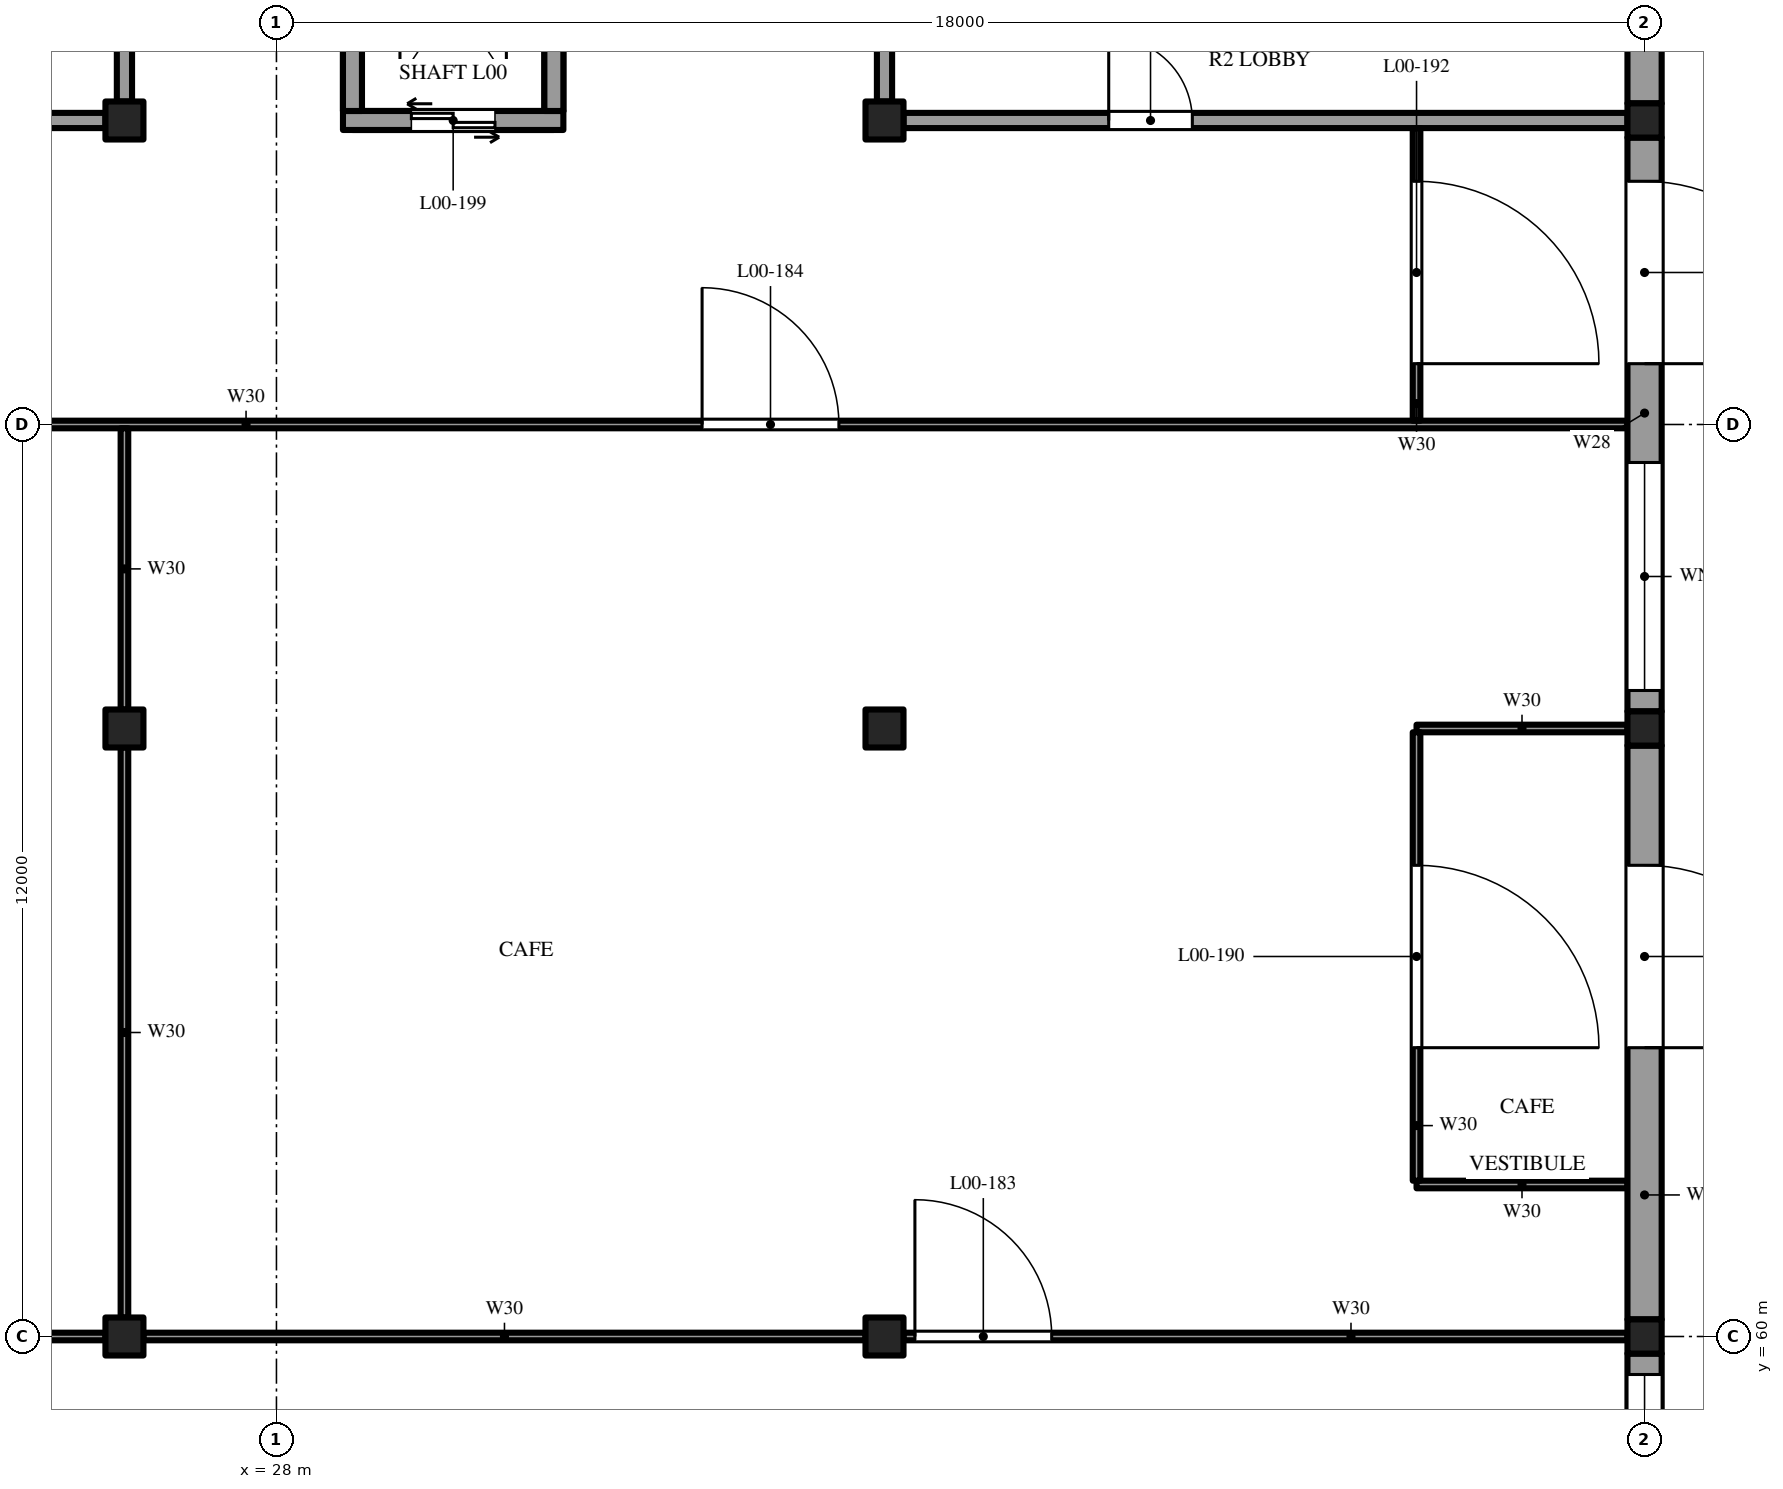
"""IFC4 building model, lengths in metres.
Left out: names, types, materials, properties, quantities, classifications, styles, units other than length and angle.
Written with IfcOpenShell. Run it as: python <this file> out.ifc"""

import sys

from ifc_helpers import new_model, si_unit, direction, frame, frame_2d, origin, origin_2d, place, context, subcontext, project, spatial, rectangle, extrude, element, fill, save


model = new_model("IFC4")
c1 = context("Model", 3, precision=1e-05, world=origin(), true_north=direction((0.0, 1.0)))
c2 = subcontext(c1, "Body", "Model", "MODEL_VIEW")
j1 = project(units=[si_unit("LENGTHUNIT", "METRE"), si_unit("PLANEANGLEUNIT", "RADIAN")], contexts=[c1])
p1 = place(None, origin())
s1 = spatial("IfcSite", under=j1, at=p1, CompositionType="ELEMENT")
p2 = place(p1, origin())
s2 = spatial("IfcBuilding", under=s1, at=p2, CompositionType="ELEMENT")
p3 = place(p2, origin())
s3 = spatial("IfcBuildingStorey", under=s2, at=p3, CompositionType="ELEMENT", Elevation=0.0)
for number, where, z_axis, x_axis in (
    (1, (26.0, 60.0, -0.4), (0.0, 0.0, 1.0), (1.0, 0.0, 0.0)),
    (2, (26.0, 68.0, -0.4), (0.0, 0.0, 1.0), (1.0, 0.0, 0.0)),
    (3, (26.0, 76.0, -0.4), (0.0, 0.0, 1.0), (1.0, 0.0, 0.0)),
    (4, (36.0, 60.0, -0.4), (0.0, 0.0, 1.0), (1.0, 0.0, 0.0)),
    (5, (36.0, 68.0, -0.4), (0.0, 0.0, 1.0), (1.0, 0.0, 0.0)),
    (6, (36.0, 76.0, -0.4), (0.0, 0.0, 1.0), (1.0, 0.0, 0.0)),
):
    element("IfcColumn", number, at=place(p3, frame(where, z_axis=z_axis, x_axis=x_axis)), inside=s3, PredefinedType="COLUMN", context=c2, shape_type="SweptSolid", body=[
        extrude(rectangle(XDim=0.5, YDim=0.5, at=origin_2d()), origin(), (0.0, 0.0, 1.0), 7.6),
    ])
for number, where, z_axis, x_axis in (
    (7, (46.0, 60.0, -0.4), (0.0, 0.0, 1.0), (1.0, 0.0, 0.0)),
    (8, (46.0, 68.0, -0.4), (0.0, 0.0, 1.0), (1.0, 0.0, 0.0)),
    (9, (46.0, 76.0, -0.4), (0.0, 0.0, 1.0), (1.0, 0.0, 0.0)),
):
    element("IfcColumn", number, at=place(p3, frame(where, z_axis=z_axis, x_axis=x_axis)), inside=s3, PredefinedType="COLUMN", context=c2, shape_type="SweptSolid", body=[
        extrude(rectangle(XDim=0.45, YDim=0.45, at=origin_2d()), origin(), (0.0, 0.0, 1.0), 7.6),
    ])
for number, where, z_axis, x_axis in (
    (10, (16.25, 60.0, 0.0), (0.0, 0.0, 1.0), (1.0, 0.0, 0.0)),
    (11, (26.25, 60.0, 0.0), (0.0, 0.0, 1.0), (1.0, 0.0, 0.0)),
):
    element("IfcWall", number, at=place(p3, frame(where, z_axis=z_axis, x_axis=x_axis)), inside=s3, PredefinedType="PARTITIONING", context=c2, shape_type="SweptSolid", body=[
        extrude(rectangle(XDim=9.5, YDim=0.1, at=frame_2d((4.75, 0.0))), origin(), (0.0, 0.0, 1.0), 6.85),
    ])
p4 = place(p3, frame((36.25, 60.0, 0.0), z_axis=(0.0, 0.0, 1.0), x_axis=(1.0, 0.0, 0.0)))
e12 = element("IfcWall", 12, at=p4, inside=s3, PredefinedType="PARTITIONING", context=c2, shape_type="SweptSolid", body=[
    extrude(rectangle(XDim=9.525, YDim=0.1, at=frame_2d((4.762, 0.0))), origin(), (0.0, 0.0, 1.0), 6.85),
])
p5 = place(p4, frame((0.15, 0.0, 0.0)))
e13 = element("IfcOpeningElement", 13, at=p5, cuts=e12, PredefinedType="OPENING", context=c2, shape_type="SweptSolid", body=[
    extrude(rectangle(XDim=1.8, YDim=2.1, at=frame_2d((0.9, 1.05))), frame((0.0, 0.06, 0.0), z_axis=(0.0, -1.0, 0.0), x_axis=(1.0, 0.0, 0.0)), (0.0, 0.0, 1.0), 0.12),
])
for number, where, z_axis, x_axis in (
    (14, (43.0, 62.0, 0.0), (0.0, 0.0, 1.0), (1.0, 0.0, 0.0)),
    (15, (43.0, 68.0, 0.0), (0.0, 0.0, 1.0), (1.0, 0.0, 0.0)),
):
    element("IfcWall", number, at=place(p3, frame(where, z_axis=z_axis, x_axis=x_axis)), inside=s3, PredefinedType="PARTITIONING", context=c2, shape_type="SweptSolid", body=[
        extrude(rectangle(XDim=2.775, YDim=0.1, at=frame_2d((1.387, 0.0))), origin(), (0.0, 0.0, 1.0), 6.85),
    ])
p6 = place(p3, frame((16.05, 72.0, 0.0), z_axis=(0.0, 0.0, 1.0), x_axis=(1.0, 0.0, 0.0)))
e16 = element("IfcWall", 16, at=p6, inside=s3, PredefinedType="PARTITIONING", context=c2, shape_type="SweptSolid", body=[
    extrude(rectangle(XDim=29.725, YDim=0.1, at=frame_2d((14.862, 0.0))), origin(), (0.0, 0.0, 1.0), 6.85),
])
p7 = place(p6, frame((4.35, 0.0, 0.0)))
e17 = element("IfcOpeningElement", 17, at=p7, cuts=e16, PredefinedType="OPENING", context=c2, shape_type="SweptSolid", body=[
    extrude(rectangle(XDim=1.2, YDim=2.1, at=frame_2d((0.6, 1.05))), frame((0.0, 0.06, 0.0), z_axis=(0.0, -1.0, 0.0), x_axis=(1.0, 0.0, 0.0)), (0.0, 0.0, 1.0), 0.12),
])
p8 = place(p6, frame((17.55, 0.0, 0.0)))
e18 = element("IfcOpeningElement", 18, at=p8, cuts=e16, PredefinedType="OPENING", context=c2, shape_type="SweptSolid", body=[
    extrude(rectangle(XDim=1.8, YDim=2.1, at=frame_2d((0.9, 1.05))), frame((0.0, 0.06, 0.0), z_axis=(0.0, -1.0, 0.0), x_axis=(1.0, 0.0, 0.0)), (0.0, 0.0, 1.0), 0.12),
])
p9 = place(p3, frame((16.25, 76.0, 0.0), z_axis=(0.0, 0.0, 1.0), x_axis=(1.0, 0.0, 0.0)))
e19 = element("IfcWall", 19, at=p9, inside=s3, PredefinedType="SOLIDWALL", context=c2, shape_type="SweptSolid", body=[
    extrude(rectangle(XDim=9.5, YDim=0.2, at=frame_2d((4.75, 0.0))), origin(), (0.0, 0.0, 1.0), 6.85),
])
p10 = place(p9, frame((4.2, 0.0, 0.0)))
e20 = element("IfcOpeningElement", 20, at=p10, cuts=e19, PredefinedType="OPENING", context=c2, shape_type="SweptSolid", body=[
    extrude(rectangle(XDim=1.1, YDim=2.1, at=frame_2d((0.55, 1.05))), frame((0.0, 0.11, 0.0), z_axis=(0.0, -1.0, 0.0), x_axis=(1.0, 0.0, 0.0)), (0.0, 0.0, 1.0), 0.22),
])
p11 = place(p3, frame((29.0, 76.0, 0.0), z_axis=(0.0, 0.0, 1.0), x_axis=(1.0, 0.0, 0.0)))
e21 = element("IfcWall", 21, at=p11, inside=s3, PredefinedType="SOLIDWALL", context=c2, shape_type="SweptSolid", body=[
    extrude(rectangle(XDim=2.65, YDim=0.25, at=frame_2d((1.325, 0.0))), origin(), (0.0, 0.0, 1.0), 6.85),
])
p12 = place(p11, frame((0.775, 0.0, 0.0)))
e22 = element("IfcOpeningElement", 22, at=p12, cuts=e21, PredefinedType="OPENING", context=c2, shape_type="SweptSolid", body=[
    extrude(rectangle(XDim=1.1, YDim=2.1, at=frame_2d((0.55, 1.05))), frame((0.0, 0.135, 0.0), z_axis=(0.0, -1.0, 0.0), x_axis=(1.0, 0.0, 0.0)), (0.0, 0.0, 1.0), 0.27),
])
p13 = place(p3, frame((36.25, 76.0, 0.0), z_axis=(0.0, 0.0, 1.0), x_axis=(1.0, 0.0, 0.0)))
e23 = element("IfcWall", 23, at=p13, inside=s3, PredefinedType="SOLIDWALL", context=c2, shape_type="SweptSolid", body=[
    extrude(rectangle(XDim=9.525, YDim=0.2, at=frame_2d((4.762, 0.0))), origin(), (0.0, 0.0, 1.0), 6.85),
])
p14 = place(p13, frame((2.7, 0.0, 0.0)))
e24 = element("IfcOpeningElement", 24, at=p14, cuts=e23, PredefinedType="OPENING", context=c2, shape_type="SweptSolid", body=[
    extrude(rectangle(XDim=1.1, YDim=2.1, at=frame_2d((0.55, 1.05))), frame((0.0, 0.11, 0.0), z_axis=(0.0, -1.0, 0.0), x_axis=(1.0, 0.0, 0.0)), (0.0, 0.0, 1.0), 0.22),
])
p15 = place(p3, frame((26.0, 60.25, 0.0), z_axis=(0.0, 0.0, 1.0), x_axis=(0.0, 1.0, 0.0)))
e25 = element("IfcWall", 25, at=p15, inside=s3, PredefinedType="PARTITIONING", context=c2, shape_type="SweptSolid", body=[
    extrude(rectangle(XDim=7.5, YDim=0.1, at=frame_2d((3.75, 0.0))), origin(), (0.0, 0.0, 1.0), 6.85),
])
p16 = place(p3, frame((26.0, 68.25, 0.0), z_axis=(0.0, 0.0, 1.0), x_axis=(0.0, 1.0, 0.0)))
e26 = element("IfcWall", 26, at=p16, inside=s3, PredefinedType="PARTITIONING", context=c2, shape_type="SweptSolid", body=[
    extrude(rectangle(XDim=3.7, YDim=0.1, at=frame_2d((1.85, 0.0))), origin(), (0.0, 0.0, 1.0), 6.85),
])
p17 = place(p3, frame((26.0, 76.25, 0.0), z_axis=(0.0, 0.0, 1.0), x_axis=(0.0, 1.0, 0.0)))
e27 = element("IfcWall", 27, at=p17, inside=s3, PredefinedType="SOLIDWALL", context=c2, shape_type="SweptSolid", body=[
    extrude(rectangle(XDim=2.275, YDim=0.2, at=frame_2d((1.137, 0.0))), origin(), (0.0, 0.0, 1.0), 6.85),
])
for number, where, z_axis, x_axis in (
    (28, (29.0, 76.125, 0.0), (0.0, 0.0, 1.0), (0.0, 1.0, 0.0)),
    (29, (31.65, 76.125, 0.0), (0.0, 0.0, 1.0), (0.0, 1.0, 0.0)),
):
    element("IfcWall", number, at=place(p3, frame(where, z_axis=z_axis, x_axis=x_axis)), inside=s3, PredefinedType="SOLIDWALL", context=c2, shape_type="SweptSolid", body=[
        extrude(rectangle(XDim=3.0, YDim=0.25, at=frame_2d((1.5, 0.0))), origin(), (0.0, 0.0, 1.0), 6.85),
    ])
p18 = place(p3, frame((36.0, 76.25, 0.0), z_axis=(0.0, 0.0, 1.0), x_axis=(0.0, 1.0, 0.0)))
e30 = element("IfcWall", 30, at=p18, inside=s3, PredefinedType="SOLIDWALL", context=c2, shape_type="SweptSolid", body=[
    extrude(rectangle(XDim=2.275, YDim=0.2, at=frame_2d((1.137, 0.0))), origin(), (0.0, 0.0, 1.0), 6.85),
])
p19 = place(p3, frame((43.0, 62.05, 0.0), z_axis=(0.0, 0.0, 1.0), x_axis=(0.0, 1.0, 0.0)))
e31 = element("IfcWall", 31, at=p19, inside=s3, PredefinedType="PARTITIONING", context=c2, shape_type="SweptSolid", body=[
    extrude(rectangle(XDim=5.9, YDim=0.1, at=frame_2d((2.95, 0.0))), origin(), (0.0, 0.0, 1.0), 6.85),
])
p20 = place(p19, frame((1.75, 0.0, 0.0)))
e32 = element("IfcOpeningElement", 32, at=p20, cuts=e31, PredefinedType="OPENING", context=c2, shape_type="SweptSolid", body=[
    extrude(rectangle(XDim=2.4, YDim=2.4, at=frame_2d((1.2, 1.2))), frame((0.0, 0.06, 0.0), z_axis=(0.0, -1.0, 0.0), x_axis=(1.0, 0.0, 0.0)), (0.0, 0.0, 1.0), 0.12),
])
p21 = place(p3, frame((43.0, 72.05, 0.0), z_axis=(0.0, 0.0, 1.0), x_axis=(0.0, 1.0, 0.0)))
e33 = element("IfcWall", 33, at=p21, inside=s3, PredefinedType="PARTITIONING", context=c2, shape_type="SweptSolid", body=[
    extrude(rectangle(XDim=3.85, YDim=0.1, at=frame_2d((1.925, 0.0))), origin(), (0.0, 0.0, 1.0), 6.85),
])
p22 = place(p21, frame((0.75, 0.0, 0.0)))
e34 = element("IfcOpeningElement", 34, at=p22, cuts=e33, PredefinedType="OPENING", context=c2, shape_type="SweptSolid", body=[
    extrude(rectangle(XDim=2.4, YDim=2.4, at=frame_2d((1.2, 1.2))), frame((0.0, 0.06, 0.0), z_axis=(0.0, -1.0, 0.0), x_axis=(1.0, 0.0, 0.0)), (0.0, 0.0, 1.0), 0.12),
])
p23 = place(p3, frame((46.0, 52.225, 0.0), z_axis=(0.0, 0.0, 1.0), x_axis=(0.0, 1.0, 0.0)))
e35 = element("IfcWall", 35, at=p23, inside=s3, PredefinedType="SOLIDWALL", context=c2, shape_type="SweptSolid", body=[
    extrude(rectangle(XDim=7.55, YDim=0.45, at=frame_2d((3.775, 0.0))), origin(), (0.0, 0.0, 1.0), 6.85),
])
p24 = place(p23, frame((0.275, 0.0, 1.0)))
e36 = element("IfcOpeningElement", 36, at=p24, cuts=e35, PredefinedType="OPENING", context=c2, shape_type="SweptSolid", body=[
    extrude(rectangle(XDim=3.0, YDim=4.0, at=frame_2d((1.5, 2.0))), frame((0.0, 0.235, 0.0), z_axis=(0.0, -1.0, 0.0), x_axis=(1.0, 0.0, 0.0)), (0.0, 0.0, 1.0), 0.47),
])
p25 = place(p23, frame((4.275, 0.0, 1.0)))
e37 = element("IfcOpeningElement", 37, at=p25, cuts=e35, PredefinedType="OPENING", context=c2, shape_type="SweptSolid", body=[
    extrude(rectangle(XDim=3.0, YDim=4.0, at=frame_2d((1.5, 2.0))), frame((0.0, 0.235, 0.0), z_axis=(0.0, -1.0, 0.0), x_axis=(1.0, 0.0, 0.0)), (0.0, 0.0, 1.0), 0.47),
])
p26 = place(p3, frame((46.0, 60.225, 0.0), z_axis=(0.0, 0.0, 1.0), x_axis=(0.0, 1.0, 0.0)))
e38 = element("IfcWall", 38, at=p26, inside=s3, PredefinedType="SOLIDWALL", context=c2, shape_type="SweptSolid", body=[
    extrude(rectangle(XDim=7.55, YDim=0.45, at=frame_2d((3.775, 0.0))), origin(), (0.0, 0.0, 1.0), 6.85),
])
p27 = place(p26, frame((3.575, 0.0, 0.0)))
e39 = element("IfcOpeningElement", 39, at=p27, cuts=e38, PredefinedType="OPENING", context=c2, shape_type="SweptSolid", body=[
    extrude(rectangle(XDim=2.4, YDim=2.4, at=frame_2d((1.2, 1.2))), frame((0.0, 0.235, 0.0), z_axis=(0.0, -1.0, 0.0), x_axis=(1.0, 0.0, 0.0)), (0.0, 0.0, 1.0), 0.47),
])
p28 = place(p3, frame((46.0, 68.225, 0.0), z_axis=(0.0, 0.0, 1.0), x_axis=(0.0, 1.0, 0.0)))
e40 = element("IfcWall", 40, at=p28, inside=s3, PredefinedType="SOLIDWALL", context=c2, shape_type="SweptSolid", body=[
    extrude(rectangle(XDim=7.55, YDim=0.45, at=frame_2d((3.775, 0.0))), origin(), (0.0, 0.0, 1.0), 6.85),
])
p29 = place(p28, frame((4.575, 0.0, 0.0)))
e41 = element("IfcOpeningElement", 41, at=p29, cuts=e40, PredefinedType="OPENING", context=c2, shape_type="SweptSolid", body=[
    extrude(rectangle(XDim=2.4, YDim=2.4, at=frame_2d((1.2, 1.2))), frame((0.0, 0.235, 0.0), z_axis=(0.0, -1.0, 0.0), x_axis=(1.0, 0.0, 0.0)), (0.0, 0.0, 1.0), 0.47),
])
p30 = place(p28, frame((0.275, 0.0, 1.0)))
e42 = element("IfcOpeningElement", 42, at=p30, cuts=e40, PredefinedType="OPENING", context=c2, shape_type="SweptSolid", body=[
    extrude(rectangle(XDim=3.0, YDim=4.0, at=frame_2d((1.5, 2.0))), frame((0.0, 0.235, 0.0), z_axis=(0.0, -1.0, 0.0), x_axis=(1.0, 0.0, 0.0)), (0.0, 0.0, 1.0), 0.47),
])
p31 = place(p3, frame((46.0, 76.225, 0.0), z_axis=(0.0, 0.0, 1.0), x_axis=(0.0, 1.0, 0.0)))
e43 = element("IfcWall", 43, at=p31, inside=s3, PredefinedType="SOLIDWALL", context=c2, shape_type="SweptSolid", body=[
    extrude(rectangle(XDim=7.55, YDim=0.45, at=frame_2d((3.775, 0.0))), origin(), (0.0, 0.0, 1.0), 6.85),
])
p32 = place(p3, frame((28.875, 76.0, -1.4), z_axis=(0.0, 0.0, 1.0), x_axis=(1.0, 0.0, 0.0)))
e44 = element("IfcWall", 44, at=p32, inside=s3, PredefinedType="SOLIDWALL", context=c2, shape_type="SweptSolid", body=[
    extrude(rectangle(XDim=2.9, YDim=0.25, at=frame_2d((1.45, 0.0))), origin(), (0.0, 0.0, 1.0), 1.1),
])
for number, where, z_axis, x_axis in (
    (45, (29.0, 76.125, -1.4), (0.0, 0.0, 1.0), (0.0, 1.0, 0.0)),
    (46, (31.65, 76.125, -1.4), (0.0, 0.0, 1.0), (0.0, 1.0, 0.0)),
):
    element("IfcWall", number, at=place(p3, frame(where, z_axis=z_axis, x_axis=x_axis)), inside=s3, PredefinedType="SOLIDWALL", context=c2, shape_type="SweptSolid", body=[
        extrude(rectangle(XDim=3.0, YDim=0.25, at=frame_2d((1.5, 0.0))), origin(), (0.0, 0.0, 1.0), 1.1),
    ])
p33 = place(p14, origin())
e47 = element("IfcDoor", 47, at=p33, inside=s3, OperationType="SINGLE_SWING_LEFT", PredefinedType="DOOR", context=c2, shape_type="SweptSolid", body=[
    extrude(rectangle(XDim=1.1, YDim=2.1, at=frame_2d((0.55, 1.05))), frame((0.0, 0.025, 0.0), z_axis=(0.0, -1.0, 0.0), x_axis=(1.0, 0.0, 0.0)), (0.0, 0.0, 1.0), 0.05),
])
fill(e24, e47)
p34 = place(p5, origin())
e48 = element("IfcDoor", 48, at=p34, inside=s3, OperationType="DOUBLE_DOOR_SINGLE_SWING", PredefinedType="DOOR", context=c2, shape_type="SweptSolid", body=[
    extrude(rectangle(XDim=1.8, YDim=2.1, at=frame_2d((0.9, 1.05))), frame((0.0, 0.025, 0.0), z_axis=(0.0, -1.0, 0.0), x_axis=(1.0, 0.0, 0.0)), (0.0, 0.0, 1.0), 0.05),
])
fill(e13, e48)
p35 = place(p8, origin())
e49 = element("IfcDoor", 49, at=p35, inside=s3, OperationType="DOUBLE_DOOR_SINGLE_SWING", PredefinedType="DOOR", context=c2, shape_type="SweptSolid", body=[
    extrude(rectangle(XDim=1.8, YDim=2.1, at=frame_2d((0.9, 1.05))), frame((0.0, 0.025, 0.0), z_axis=(0.0, -1.0, 0.0), x_axis=(1.0, 0.0, 0.0)), (0.0, 0.0, 1.0), 0.05),
])
fill(e18, e49)
p36 = place(p20, frame((2.4, 0.0, 0.0), z_axis=(0.0, 0.0, 1.0), x_axis=(-1.0, 0.0, 0.0)))
e50 = element("IfcDoor", 50, at=p36, inside=s3, OperationType="DOUBLE_DOOR_SINGLE_SWING", PredefinedType="DOOR", context=c2, shape_type="SweptSolid", body=[
    extrude(rectangle(XDim=2.4, YDim=2.4, at=frame_2d((1.2, 1.2))), frame((0.0, 0.025, 0.0), z_axis=(0.0, -1.0, 0.0), x_axis=(1.0, 0.0, 0.0)), (0.0, 0.0, 1.0), 0.05),
])
fill(e32, e50)
p37 = place(p27, frame((2.4, 0.0, 0.0), z_axis=(0.0, 0.0, 1.0), x_axis=(-1.0, 0.0, 0.0)))
e51 = element("IfcDoor", 51, at=p37, inside=s3, OperationType="DOUBLE_DOOR_SINGLE_SWING", PredefinedType="DOOR", context=c2, shape_type="SweptSolid", body=[
    extrude(rectangle(XDim=2.4, YDim=2.4, at=frame_2d((1.2, 1.2))), frame((0.0, 0.025, 0.0), z_axis=(0.0, -1.0, 0.0), x_axis=(1.0, 0.0, 0.0)), (0.0, 0.0, 1.0), 0.05),
])
fill(e39, e51)
p38 = place(p22, frame((2.4, 0.0, 0.0), z_axis=(0.0, 0.0, 1.0), x_axis=(-1.0, 0.0, 0.0)))
e52 = element("IfcDoor", 52, at=p38, inside=s3, OperationType="DOUBLE_DOOR_SINGLE_SWING", PredefinedType="DOOR", context=c2, shape_type="SweptSolid", body=[
    extrude(rectangle(XDim=2.4, YDim=2.4, at=frame_2d((1.2, 1.2))), frame((0.0, 0.025, 0.0), z_axis=(0.0, -1.0, 0.0), x_axis=(1.0, 0.0, 0.0)), (0.0, 0.0, 1.0), 0.05),
])
fill(e34, e52)
p39 = place(p29, frame((2.4, 0.0, 0.0), z_axis=(0.0, 0.0, 1.0), x_axis=(-1.0, 0.0, 0.0)))
e53 = element("IfcDoor", 53, at=p39, inside=s3, OperationType="DOUBLE_DOOR_SINGLE_SWING", PredefinedType="DOOR", context=c2, shape_type="SweptSolid", body=[
    extrude(rectangle(XDim=2.4, YDim=2.4, at=frame_2d((1.2, 1.2))), frame((0.0, 0.025, 0.0), z_axis=(0.0, -1.0, 0.0), x_axis=(1.0, 0.0, 0.0)), (0.0, 0.0, 1.0), 0.05),
])
fill(e41, e53)
p40 = place(p12, origin())
e54 = element("IfcDoor", 54, at=p40, inside=s3, OperationType="DOUBLE_DOOR_SLIDING", PredefinedType="DOOR", context=c2, shape_type="SweptSolid", body=[
    extrude(rectangle(XDim=1.1, YDim=2.1, at=frame_2d((0.55, 1.05))), frame((0.0, 0.025, 0.0), z_axis=(0.0, -1.0, 0.0), x_axis=(1.0, 0.0, 0.0)), (0.0, 0.0, 1.0), 0.05),
])
fill(e22, e54)
p41 = place(p25, origin())
e55 = element("IfcWindow", 55, at=p41, inside=s3, PartitioningType="SINGLE_PANEL", PredefinedType="WINDOW", context=c2, shape_type="SweptSolid", body=[
    extrude(rectangle(XDim=3.0, YDim=4.0, at=frame_2d((1.5, 2.0))), frame((0.0, 0.215, 0.0), z_axis=(0.0, -1.0, 0.0), x_axis=(1.0, 0.0, 0.0)), (0.0, 0.0, 1.0), 0.06),
])
fill(e37, e55)
p42 = place(p30, origin())
e56 = element("IfcWindow", 56, at=p42, inside=s3, PartitioningType="SINGLE_PANEL", PredefinedType="WINDOW", context=c2, shape_type="SweptSolid", body=[
    extrude(rectangle(XDim=3.0, YDim=4.0, at=frame_2d((1.5, 2.0))), frame((0.0, 0.215, 0.0), z_axis=(0.0, -1.0, 0.0), x_axis=(1.0, 0.0, 0.0)), (0.0, 0.0, 1.0), 0.06),
])
fill(e42, e56)
save(model, sys.argv[1])
